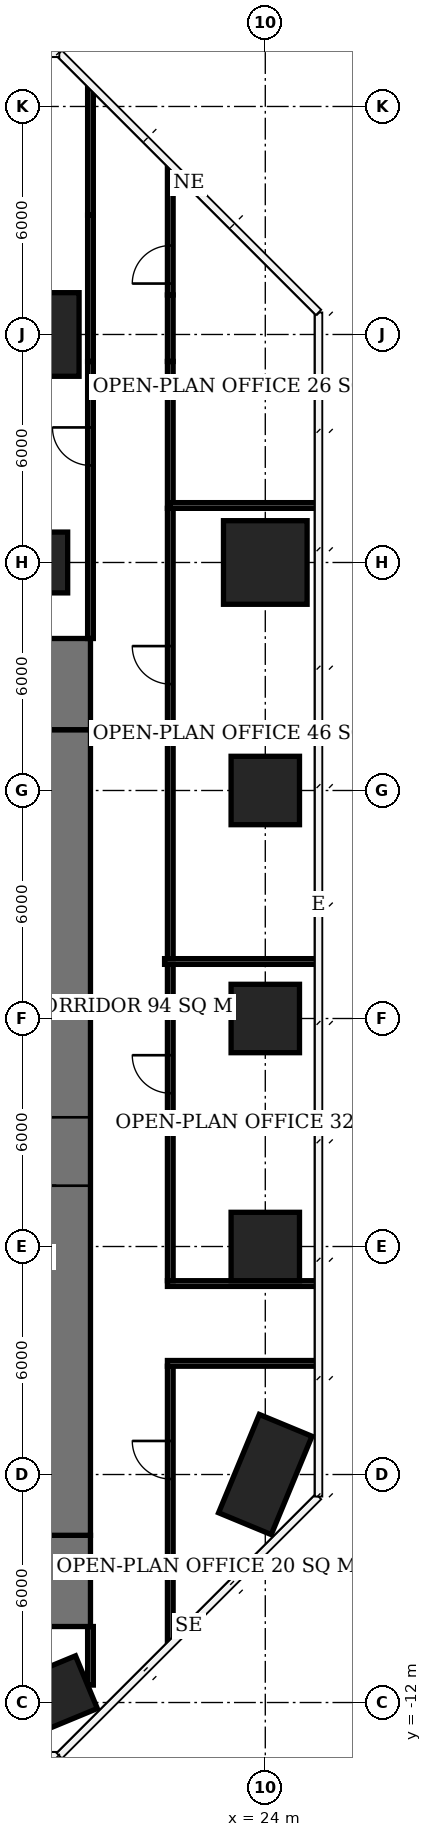
"""IFC4 building model, lengths in metres.
Left out: names, types, materials, properties, quantities, classifications, styles, units other than length and angle.
Written with IfcOpenShell. Run it as: python <this file> out.ifc"""

import sys

from ifc_helpers import new_model, si_unit, direction, frame, frame_2d, origin, origin_2d, place, context, subcontext, project, spatial, rectangle, extrude, element, fill, save


model = new_model("IFC4")
c1 = context("Model", 3, precision=1e-05, world=origin(), true_north=direction((0.0, 1.0)))
c2 = subcontext(c1, "Body", "Model", "MODEL_VIEW")
j1 = project(units=[si_unit("LENGTHUNIT", "METRE"), si_unit("PLANEANGLEUNIT", "RADIAN")], contexts=[c1])
p1 = place(None, origin())
s1 = spatial("IfcSite", under=j1, at=p1, CompositionType="ELEMENT")
p2 = place(p1, origin())
s2 = spatial("IfcBuilding", under=s1, at=p2, CompositionType="ELEMENT")
p3 = place(p2, frame((0.0, 0.0, 109.4)))
s3 = spatial("IfcBuildingStorey", under=s2, at=p3, CompositionType="ELEMENT", Elevation=109.4)
p4 = place(p3, frame((18.0, -12.0, 0.0), z_axis=(0.0, 0.0, 1.0), x_axis=(-0.923879532511, -0.382683432365, 0.0)))
e1 = element("IfcColumn", 1, at=p4, inside=s3, PredefinedType="COLUMN", context=c2, shape_type="SweptSolid", body=[
    extrude(rectangle(XDim=2.8, YDim=1.5, at=origin_2d()), origin(), (0.0, 0.0, 1.0), 3.9),
])
p5 = place(p3, frame((18.0, 18.0, 0.0), z_axis=(0.0, 0.0, 1.0), x_axis=(1.0, 0.0, 0.0)))
e2 = element("IfcColumn", 2, at=p5, inside=s3, PredefinedType="COLUMN", context=c2, shape_type="SweptSolid", body=[
    extrude(rectangle(XDim=1.6, YDim=1.6, at=origin_2d()), origin(), (0.0, 0.0, 1.0), 3.9),
])
p6 = place(p3, frame((18.0, 24.0, 0.0), z_axis=(0.0, 0.0, 1.0), x_axis=(1.0, 0.0, 0.0)))
e3 = element("IfcColumn", 3, at=p6, inside=s3, PredefinedType="COLUMN", context=c2, shape_type="SweptSolid", body=[
    extrude(rectangle(XDim=2.2, YDim=2.2, at=origin_2d()), origin(), (0.0, 0.0, 1.0), 3.9),
])
p7 = place(p3, frame((24.0, -6.0, 0.0), z_axis=(0.0, 0.0, 1.0), x_axis=(-0.382683432365, -0.923879532511, 0.0)))
e4 = element("IfcColumn", 4, at=p7, inside=s3, PredefinedType="COLUMN", context=c2, shape_type="SweptSolid", body=[
    extrude(rectangle(XDim=2.8, YDim=1.5, at=origin_2d()), origin(), (0.0, 0.0, 1.0), 3.9),
])
for number, where, z_axis, x_axis in (
    (5, (24.0, 0.0, 0.0), (0.0, 0.0, 1.0), (1.0, 0.0, 0.0)),
    (6, (24.0, 6.0, 0.0), (0.0, 0.0, 1.0), (1.0, 0.0, 0.0)),
    (7, (24.0, 12.0, 0.0), (0.0, 0.0, 1.0), (1.0, 0.0, 0.0)),
):
    element("IfcColumn", number, at=place(p3, frame(where, z_axis=z_axis, x_axis=x_axis)), inside=s3, PredefinedType="COLUMN", context=c2, shape_type="SweptSolid", body=[
        extrude(rectangle(XDim=1.8, YDim=1.8, at=origin_2d()), origin(), (0.0, 0.0, 1.0), 3.9),
    ])
p8 = place(p3, frame((24.0, 18.0, 0.0), z_axis=(0.0, 0.0, 1.0), x_axis=(1.0, 0.0, 0.0)))
e8 = element("IfcColumn", 8, at=p8, inside=s3, PredefinedType="COLUMN", context=c2, shape_type="SweptSolid", body=[
    extrude(rectangle(XDim=2.2, YDim=2.2, at=origin_2d()), origin(), (0.0, 0.0, 1.0), 3.9),
])
p9 = place(p3, frame((18.5, -7.6, 0.0), z_axis=(0.0, 0.0, 1.0), x_axis=(0.0, 1.0, 0.0)))
e9 = element("IfcWall", 9, at=p9, inside=s3, PredefinedType="SHEAR", context=c2, shape_type="SweptSolid", body=[
    extrude(rectangle(XDim=21.2, YDim=1.8, at=frame_2d((10.6, 0.0))), origin(), (0.0, 0.0, 1.0), 3.9),
])
p10 = place(p9, frame((9.2, 0.0, 0.0)))
e10 = element("IfcOpeningElement", 10, at=p10, cuts=e9, PredefinedType="OPENING", context=c2, shape_type="SweptSolid", body=[
    extrude(rectangle(XDim=1.8, YDim=2.4, at=frame_2d((0.9, 1.2))), frame((0.0, 0.91, 0.0), z_axis=(0.0, -1.0, 0.0), x_axis=(1.0, 0.0, 0.0)), (0.0, 0.0, 1.0), 1.82),
])
for number, where, z_axis, x_axis in (
    (11, (18.5, -10.0, 0.0), (0.0, 0.0, 1.0), (0.0, 1.0, 0.0)),
    (12, (18.5, 13.6, 0.0), (0.0, 0.0, 1.0), (0.0, 1.0, 0.0)),
):
    element("IfcWall", number, at=place(p3, frame(where, z_axis=z_axis, x_axis=x_axis)), inside=s3, PredefinedType="SHEAR", context=c2, shape_type="SweptSolid", body=[
        extrude(rectangle(XDim=2.4, YDim=1.8, at=frame_2d((1.2, 0.0))), origin(), (0.0, 0.0, 1.0), 3.9),
    ])
p11 = place(p3, frame((19.4, -11.541, 0.0), z_axis=(0.0, 0.0, 1.0), x_axis=(0.0, 1.0, 0.0)))
e13 = element("IfcWall", 13, at=p11, inside=s3, PredefinedType="PARTITIONING", context=c2, shape_type="SweptSolid", body=[
    extrude(rectangle(XDim=1.541, YDim=0.15, at=frame_2d((0.77, 0.0))), origin(), (0.0, 0.0, 1.0), 3.65),
])
p12 = place(p3, frame((19.4, 16.0, 0.0), z_axis=(0.0, 0.0, 1.0), x_axis=(0.0, 1.0, 0.0)))
e14 = element("IfcWall", 14, at=p12, inside=s3, PredefinedType="PARTITIONING", context=c2, shape_type="SweptSolid", body=[
    extrude(rectangle(XDim=7.29, YDim=0.15, at=frame_2d((3.645, 0.0))), origin(), (0.0, 0.0, 1.0), 3.65),
])
p13 = place(p12, frame((4.554, 0.0, 0.0)))
e15 = element("IfcOpeningElement", 15, at=p13, cuts=e14, PredefinedType="OPENING", context=c2, shape_type="SweptSolid", body=[
    extrude(rectangle(XDim=1.0, YDim=2.1, at=frame_2d((0.5, 1.05))), frame((0.0, 0.085, 0.0), z_axis=(0.0, -1.0, 0.0), x_axis=(1.0, 0.0, 0.0)), (0.0, 0.0, 1.0), 0.17),
])
p14 = place(p3, frame((19.4, 23.29, 0.0), z_axis=(0.0, 0.0, 1.0), x_axis=(0.0, 1.0, 0.0)))
e16 = element("IfcWall", 16, at=p14, inside=s3, PredefinedType="PARTITIONING", context=c2, shape_type="SweptSolid", body=[
    extrude(rectangle(XDim=3.85, YDim=0.15, at=frame_2d((1.925, 0.0))), origin(), (0.0, 0.0, 1.0), 2.65),
])
p15 = place(p3, frame((19.4, 27.14, 0.0), z_axis=(0.0, 0.0, 1.0), x_axis=(0.0, 1.0, 0.0)))
e17 = element("IfcWall", 17, at=p15, inside=s3, PredefinedType="PARTITIONING", context=c2, shape_type="SweptSolid", body=[
    extrude(rectangle(XDim=3.349, YDim=0.15, at=frame_2d((1.675, 0.0))), origin(), (0.0, 0.0, 1.0), 3.65),
])
p16 = place(p3, frame((21.5, -10.388, 0.0), z_axis=(0.0, 0.0, 1.0), x_axis=(0.0, 1.0, 0.0)))
e18 = element("IfcWall", 18, at=p16, inside=s3, PredefinedType="PARTITIONING", context=c2, shape_type="SweptSolid", body=[
    extrude(rectangle(XDim=7.238, YDim=0.15, at=frame_2d((3.619, 0.0))), origin(), (0.0, 0.0, 1.0), 3.65),
])
p17 = place(p16, frame((4.271, 0.0, 0.0)))
e19 = element("IfcOpeningElement", 19, at=p17, cuts=e18, PredefinedType="OPENING", context=c2, shape_type="SweptSolid", body=[
    extrude(rectangle(XDim=1.0, YDim=2.1, at=frame_2d((0.5, 1.05))), frame((0.0, 0.085, 0.0), z_axis=(0.0, -1.0, 0.0), x_axis=(1.0, 0.0, 0.0)), (0.0, 0.0, 1.0), 0.17),
])
p18 = place(p3, frame((21.425, -3.075, 0.0), z_axis=(0.0, 0.0, 1.0), x_axis=(1.0, 0.0, 0.0)))
e20 = element("IfcWall", 20, at=p18, inside=s3, PredefinedType="PARTITIONING", context=c2, shape_type="SweptSolid", body=[
    extrude(rectangle(XDim=3.975, YDim=0.15, at=frame_2d((1.987, 0.0))), origin(), (0.0, 0.0, 1.0), 3.65),
])
p19 = place(p3, frame((21.5, -0.9, 0.0), z_axis=(0.0, 0.0, 1.0), x_axis=(0.0, 1.0, 0.0)))
e21 = element("IfcWall", 21, at=p19, inside=s3, PredefinedType="PARTITIONING", context=c2, shape_type="SweptSolid", body=[
    extrude(rectangle(XDim=8.325, YDim=0.15, at=frame_2d((4.163, 0.0))), origin(), (0.0, 0.0, 1.0), 3.65),
])
p20 = place(p19, frame((4.934, 0.0, 0.0)))
e22 = element("IfcOpeningElement", 22, at=p20, cuts=e21, PredefinedType="OPENING", context=c2, shape_type="SweptSolid", body=[
    extrude(rectangle(XDim=1.0, YDim=2.1, at=frame_2d((0.5, 1.05))), frame((0.0, 0.085, 0.0), z_axis=(0.0, -1.0, 0.0), x_axis=(1.0, 0.0, 0.0)), (0.0, 0.0, 1.0), 0.17),
])
p21 = place(p3, frame((21.425, -0.975, 0.0), z_axis=(0.0, 0.0, 1.0), x_axis=(1.0, 0.0, 0.0)))
e23 = element("IfcWall", 23, at=p21, inside=s3, PredefinedType="PARTITIONING", context=c2, shape_type="SweptSolid", body=[
    extrude(rectangle(XDim=3.975, YDim=0.15, at=frame_2d((1.987, 0.0))), origin(), (0.0, 0.0, 1.0), 3.65),
])
p22 = place(p3, frame((21.5, 7.575, 0.0), z_axis=(0.0, 0.0, 1.0), x_axis=(0.0, 1.0, 0.0)))
e24 = element("IfcWall", 24, at=p22, inside=s3, PredefinedType="PARTITIONING", context=c2, shape_type="SweptSolid", body=[
    extrude(rectangle(XDim=11.85, YDim=0.15, at=frame_2d((5.925, 0.0))), origin(), (0.0, 0.0, 1.0), 3.65),
])
p23 = place(p22, frame((7.225, 0.0, 0.0)))
e25 = element("IfcOpeningElement", 25, at=p23, cuts=e24, PredefinedType="OPENING", context=c2, shape_type="SweptSolid", body=[
    extrude(rectangle(XDim=1.0, YDim=2.1, at=frame_2d((0.5, 1.05))), frame((0.0, 0.085, 0.0), z_axis=(0.0, -1.0, 0.0), x_axis=(1.0, 0.0, 0.0)), (0.0, 0.0, 1.0), 0.17),
])
p24 = place(p3, frame((21.35, 7.5, 0.0), z_axis=(0.0, 0.0, 1.0), x_axis=(1.0, 0.0, 0.0)))
e26 = element("IfcWall", 26, at=p24, inside=s3, PredefinedType="PARTITIONING", context=c2, shape_type="SweptSolid", body=[
    extrude(rectangle(XDim=4.05, YDim=0.15, at=frame_2d((2.025, 0.0))), origin(), (0.0, 0.0, 1.0), 3.65),
])
p25 = place(p3, frame((21.5, 19.425, 0.0), z_axis=(0.0, 0.0, 1.0), x_axis=(0.0, 1.0, 0.0)))
e27 = element("IfcWall", 27, at=p25, inside=s3, PredefinedType="PARTITIONING", context=c2, shape_type="SweptSolid", body=[
    extrude(rectangle(XDim=3.865, YDim=0.15, at=frame_2d((1.933, 0.0))), origin(), (0.0, 0.0, 1.0), 3.65),
])
p26 = place(p3, frame((21.5, 23.29, 0.0), z_axis=(0.0, 0.0, 1.0), x_axis=(0.0, 1.0, 0.0)))
e28 = element("IfcWall", 28, at=p26, inside=s3, PredefinedType="PARTITIONING", context=c2, shape_type="SweptSolid", body=[
    extrude(rectangle(XDim=1.75, YDim=0.15, at=frame_2d((0.875, 0.0))), origin(), (0.0, 0.0, 1.0), 2.65),
])
p27 = place(p3, frame((21.5, 25.04, 0.0), z_axis=(0.0, 0.0, 1.0), x_axis=(0.0, 1.0, 0.0)))
e29 = element("IfcWall", 29, at=p27, inside=s3, PredefinedType="PARTITIONING", context=c2, shape_type="SweptSolid", body=[
    extrude(rectangle(XDim=3.348, YDim=0.15, at=frame_2d((1.674, 0.0))), origin(), (0.0, 0.0, 1.0), 3.65),
])
p28 = place(p27, frame((0.3, 0.0, 0.0)))
e30 = element("IfcOpeningElement", 30, at=p28, cuts=e29, PredefinedType="OPENING", context=c2, shape_type="SweptSolid", body=[
    extrude(rectangle(XDim=1.0, YDim=2.1, at=frame_2d((0.5, 1.05))), frame((0.0, 0.085, 0.0), z_axis=(0.0, -1.0, 0.0), x_axis=(1.0, 0.0, 0.0)), (0.0, 0.0, 1.0), 0.17),
])
p29 = place(p3, frame((21.5, 19.5, 0.0), z_axis=(0.0, 0.0, 1.0), x_axis=(1.0, 0.0, 0.0)))
e31 = element("IfcWall", 31, at=p29, inside=s3, PredefinedType="PARTITIONING", context=c2, shape_type="SweptSolid", body=[
    extrude(rectangle(XDim=3.9, YDim=0.15, at=frame_2d((1.95, 0.0))), origin(), (0.0, 0.0, 1.0), 3.65),
])
p30 = place(p10, origin())
e32 = element("IfcDoor", 32, at=p30, inside=s3, OperationType="DOUBLE_DOOR_SINGLE_SWING", PredefinedType="DOOR", context=c2, shape_type="SweptSolid", body=[
    extrude(rectangle(XDim=1.8, YDim=2.4, at=frame_2d((0.9, 1.2))), frame((0.0, 0.025, 0.0), z_axis=(0.0, -1.0, 0.0), x_axis=(1.0, 0.0, 0.0)), (0.0, 0.0, 1.0), 0.05),
])
fill(e10, e32)
p31 = place(p17, origin())
e33 = element("IfcDoor", 33, at=p31, inside=s3, OperationType="SINGLE_SWING_RIGHT", PredefinedType="DOOR", context=c2, shape_type="SweptSolid", body=[
    extrude(rectangle(XDim=1.0, YDim=2.1, at=frame_2d((0.5, 1.05))), frame((0.0, 0.025, 0.0), z_axis=(0.0, -1.0, 0.0), x_axis=(1.0, 0.0, 0.0)), (0.0, 0.0, 1.0), 0.05),
])
fill(e19, e33)
p32 = place(p20, origin())
e34 = element("IfcDoor", 34, at=p32, inside=s3, OperationType="SINGLE_SWING_RIGHT", PredefinedType="DOOR", context=c2, shape_type="SweptSolid", body=[
    extrude(rectangle(XDim=1.0, YDim=2.1, at=frame_2d((0.5, 1.05))), frame((0.0, 0.025, 0.0), z_axis=(0.0, -1.0, 0.0), x_axis=(1.0, 0.0, 0.0)), (0.0, 0.0, 1.0), 0.05),
])
fill(e22, e34)
p33 = place(p23, origin())
e35 = element("IfcDoor", 35, at=p33, inside=s3, OperationType="SINGLE_SWING_RIGHT", PredefinedType="DOOR", context=c2, shape_type="SweptSolid", body=[
    extrude(rectangle(XDim=1.0, YDim=2.1, at=frame_2d((0.5, 1.05))), frame((0.0, 0.025, 0.0), z_axis=(0.0, -1.0, 0.0), x_axis=(1.0, 0.0, 0.0)), (0.0, 0.0, 1.0), 0.05),
])
fill(e25, e35)
p34 = place(p13, origin())
e36 = element("IfcDoor", 36, at=p34, inside=s3, OperationType="SINGLE_SWING_RIGHT", PredefinedType="DOOR", context=c2, shape_type="SweptSolid", body=[
    extrude(rectangle(XDim=1.0, YDim=2.1, at=frame_2d((0.5, 1.05))), frame((0.0, 0.025, 0.0), z_axis=(0.0, -1.0, 0.0), x_axis=(1.0, 0.0, 0.0)), (0.0, 0.0, 1.0), 0.05),
])
fill(e15, e36)
p35 = place(p28, origin())
e37 = element("IfcDoor", 37, at=p35, inside=s3, OperationType="SINGLE_SWING_LEFT", PredefinedType="DOOR", context=c2, shape_type="SweptSolid", body=[
    extrude(rectangle(XDim=1.0, YDim=2.1, at=frame_2d((0.5, 1.05))), frame((0.0, 0.025, 0.0), z_axis=(0.0, -1.0, 0.0), x_axis=(1.0, 0.0, 0.0)), (0.0, 0.0, 1.0), 0.05),
])
fill(e30, e37)
save(model, sys.argv[1])
